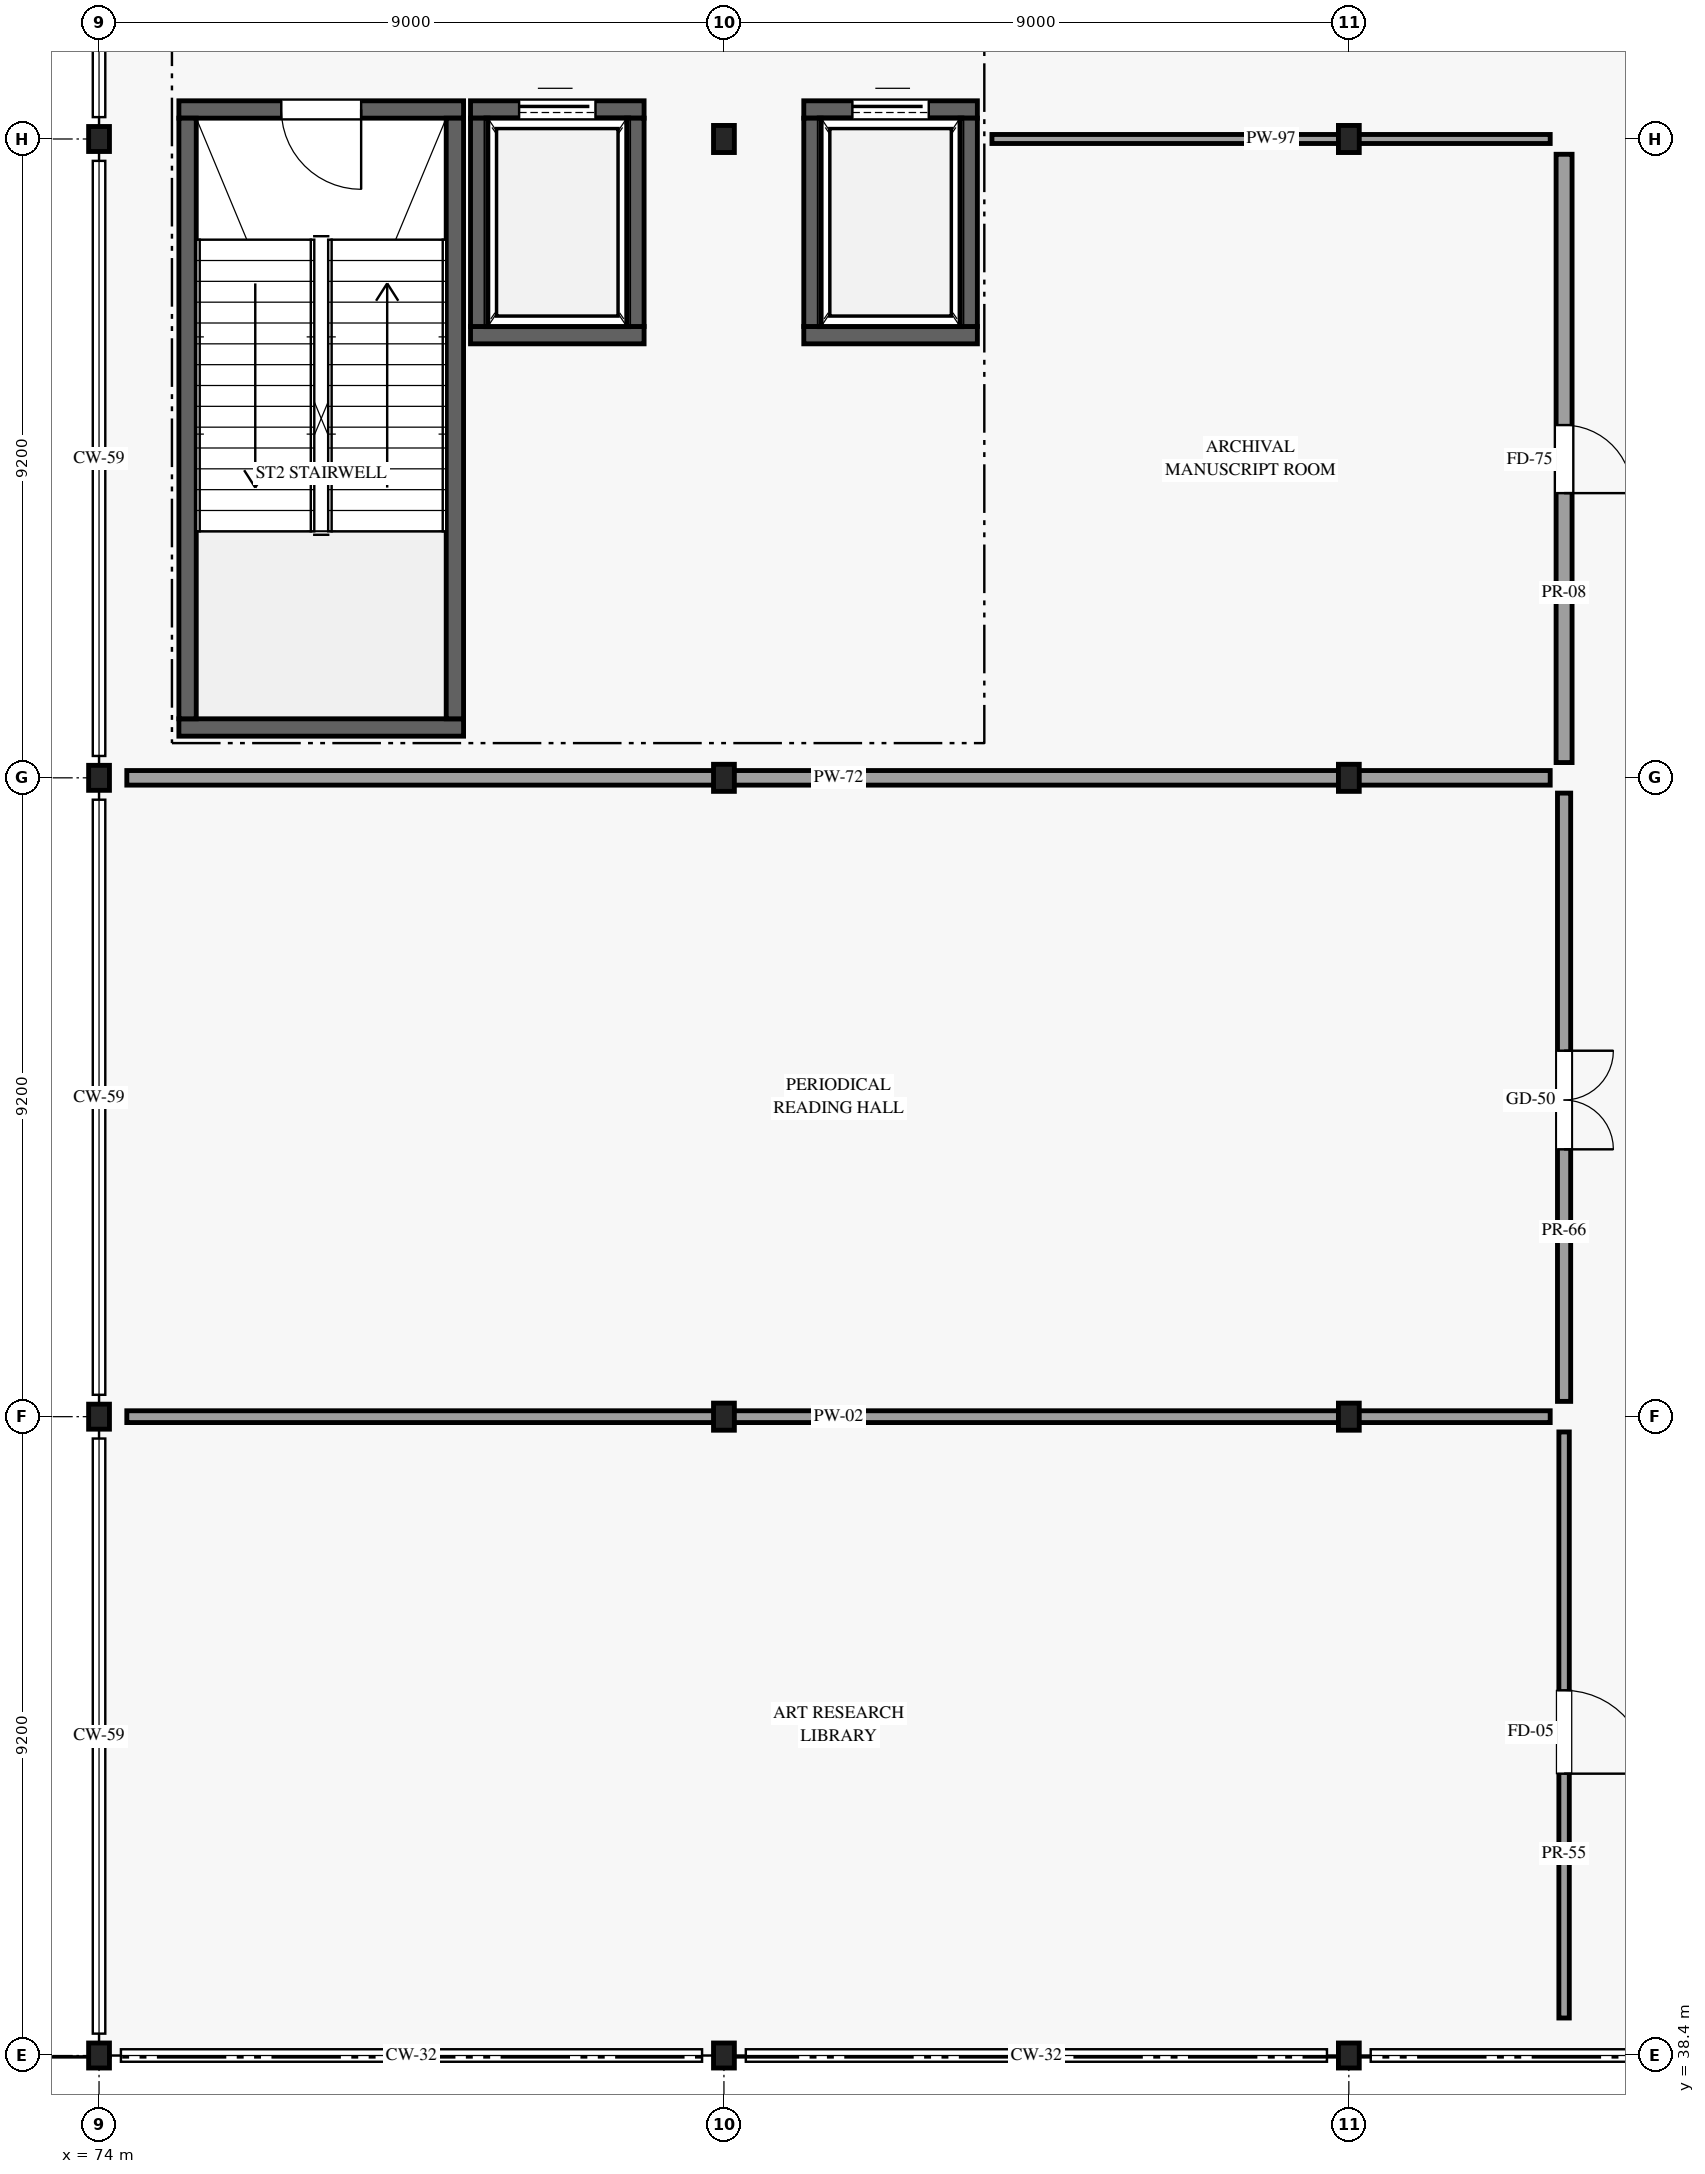
"""IFC4 building model, lengths in metres.
Left out: names, types, materials, properties, quantities, classifications, styles, units other than length and angle.
Written with IfcOpenShell. Run it as: python <this file> out.ifc"""

import sys

from ifc_helpers import new_model, si_unit, direction, frame, frame_2d, origin, origin_2d, place, context, subcontext, project, spatial, rectangle, i_section, extrude, element, fill, save


model = new_model("IFC4")
c1 = context("Model", 3, precision=1e-05, world=origin(), true_north=direction((0.0, 1.0)))
c2 = subcontext(c1, "Body", "Model", "MODEL_VIEW")
j1 = project(units=[si_unit("LENGTHUNIT", "METRE"), si_unit("PLANEANGLEUNIT", "RADIAN")], contexts=[c1])
p1 = place(None, origin())
s1 = spatial("IfcSite", under=j1, at=p1, CompositionType="ELEMENT")
p2 = place(p1, origin())
s2 = spatial("IfcBuilding", under=s1, at=p2, CompositionType="ELEMENT")
p3 = place(p2, frame((0.0, 0.0, 15.0)))
s3 = spatial("IfcBuildingStorey", under=s2, at=p3, CompositionType="ELEMENT", Elevation=15.0)
for number, where, z_axis, x_axis in (
    (1, (74.0, 38.4, 0.0), (0.0, 0.0, 1.0), (1.0, 0.0, 0.0)),
    (2, (74.0, 47.6, 0.0), (0.0, 0.0, 1.0), (1.0, 0.0, 0.0)),
    (3, (74.0, 56.8, 0.0), (0.0, 0.0, 1.0), (1.0, 0.0, 0.0)),
    (4, (74.0, 66.0, 0.0), (0.0, 0.0, 1.0), (1.0, 0.0, 0.0)),
    (5, (83.0, 38.4, 0.0), (0.0, 0.0, 1.0), (1.0, 0.0, 0.0)),
):
    element("IfcColumn", number, at=place(p3, frame(where, z_axis=z_axis, x_axis=x_axis)), inside=s3, PredefinedType="COLUMN", context=c2, shape_type="SweptSolid", body=[
        extrude(i_section(OverallWidth=0.3, OverallDepth=0.36, WebThickness=0.012, FlangeThickness=0.022, FilletRadius=0.027, at=origin_2d()), origin(), (0.0, 0.0, 1.0), 4.5),
    ])
for number, where, z_axis, x_axis in (
    (6, (83.0, 47.6, 0.0), (0.0, 0.0, 1.0), (1.0, 0.0, 0.0)),
    (7, (83.0, 56.8, 0.0), (0.0, 0.0, 1.0), (1.0, 0.0, 0.0)),
    (8, (83.0, 66.0, 0.0), (0.0, 0.0, 1.0), (1.0, 0.0, 0.0)),
):
    element("IfcColumn", number, at=place(p3, frame(where, z_axis=z_axis, x_axis=x_axis)), inside=s3, PredefinedType="COLUMN", context=c2, shape_type="SweptSolid", body=[
        extrude(i_section(OverallWidth=0.3, OverallDepth=0.39, WebThickness=0.011, FlangeThickness=0.019, FilletRadius=0.027, at=origin_2d()), origin(), (0.0, 0.0, 1.0), 4.5),
    ])
p4 = place(p3, frame((92.0, 38.4, 0.0), z_axis=(0.0, 0.0, 1.0), x_axis=(1.0, 0.0, 0.0)))
e9 = element("IfcColumn", 9, at=p4, inside=s3, PredefinedType="COLUMN", context=c2, shape_type="SweptSolid", body=[
    extrude(i_section(OverallWidth=0.3, OverallDepth=0.36, WebThickness=0.012, FlangeThickness=0.022, FilletRadius=0.027, at=origin_2d()), origin(), (0.0, 0.0, 1.0), 4.5),
])
for number, where, z_axis, x_axis in (
    (10, (92.0, 47.6, 0.0), (0.0, 0.0, 1.0), (1.0, 0.0, 0.0)),
    (11, (92.0, 56.8, 0.0), (0.0, 0.0, 1.0), (1.0, 0.0, 0.0)),
    (12, (92.0, 66.0, 0.0), (0.0, 0.0, 1.0), (1.0, 0.0, 0.0)),
):
    element("IfcColumn", number, at=place(p3, frame(where, z_axis=z_axis, x_axis=x_axis)), inside=s3, PredefinedType="COLUMN", context=c2, shape_type="SweptSolid", body=[
        extrude(i_section(OverallWidth=0.3, OverallDepth=0.39, WebThickness=0.011, FlangeThickness=0.019, FilletRadius=0.027, at=origin_2d()), origin(), (0.0, 0.0, 1.0), 4.5),
    ])
p5 = place(p3, frame((75.15, 66.425, 0.0), z_axis=(0.0, 0.0, 1.0), x_axis=(1.0, 0.0, 0.0)))
e13 = element("IfcWall", 13, at=p5, inside=s3, PredefinedType="SHEAR", context=c2, shape_type="SweptSolid", body=[
    extrude(rectangle(XDim=4.1, YDim=0.25, at=frame_2d((2.05, 0.0))), origin(), (0.0, 0.0, 1.0), 4.18),
])
p6 = place(p5, frame((2.625, 0.0, 0.0), z_axis=(0.0, 0.0, 1.0), x_axis=(-1.0, 0.0, 0.0)))
e14 = element("IfcOpeningElement", 14, at=p6, cuts=e13, PredefinedType="OPENING", context=c2, shape_type="SweptSolid", body=[
    extrude(rectangle(XDim=1.15, YDim=2.2, at=frame_2d((0.575, 1.1))), frame((0.0, 0.135, 0.0), z_axis=(0.0, -1.0, 0.0), x_axis=(1.0, 0.0, 0.0)), (0.0, 0.0, 1.0), 0.27),
])
p7 = place(p3, frame((75.15, 57.525, 0.0), z_axis=(0.0, 0.0, 1.0), x_axis=(1.0, 0.0, 0.0)))
e15 = element("IfcWall", 15, at=p7, inside=s3, PredefinedType="SHEAR", context=c2, shape_type="SweptSolid", body=[
    extrude(rectangle(XDim=4.1, YDim=0.25, at=frame_2d((2.05, 0.0))), origin(), (0.0, 0.0, 1.0), 4.18),
])
for number, where, z_axis, x_axis in (
    (16, (75.275, 57.65, 0.0), (0.0, 0.0, 1.0), (0.0, 1.0, 0.0)),
    (17, (79.125, 57.65, 0.0), (0.0, 0.0, 1.0), (0.0, 1.0, 0.0)),
):
    element("IfcWall", number, at=place(p3, frame(where, z_axis=z_axis, x_axis=x_axis)), inside=s3, PredefinedType="SHEAR", context=c2, shape_type="SweptSolid", body=[
        extrude(rectangle(XDim=8.65, YDim=0.25, at=frame_2d((4.325, 0.0))), origin(), (0.0, 0.0, 1.0), 4.18),
    ])
p8 = place(p3, frame((79.35, 66.425, 0.0), z_axis=(0.0, 0.0, 1.0), x_axis=(1.0, 0.0, 0.0)))
e18 = element("IfcWall", 18, at=p8, inside=s3, PredefinedType="SHEAR", context=c2, shape_type="SweptSolid", body=[
    extrude(rectangle(XDim=2.5, YDim=0.25, at=frame_2d((1.25, 0.0))), origin(), (0.0, 0.0, 1.0), 4.18),
])
p9 = place(p8, frame((0.7, 0.0, 0.0)))
e19 = element("IfcOpeningElement", 19, at=p9, cuts=e18, PredefinedType="OPENING", context=c2, shape_type="SweptSolid", body=[
    extrude(rectangle(XDim=1.1, YDim=2.2, at=frame_2d((0.55, 1.1))), frame((0.0, 0.135, 0.0), z_axis=(0.0, -1.0, 0.0), x_axis=(1.0, 0.0, 0.0)), (0.0, 0.0, 1.0), 0.27),
])
p10 = place(p3, frame((79.35, 63.175, 0.0), z_axis=(0.0, 0.0, 1.0), x_axis=(1.0, 0.0, 0.0)))
e20 = element("IfcWall", 20, at=p10, inside=s3, PredefinedType="SHEAR", context=c2, shape_type="SweptSolid", body=[
    extrude(rectangle(XDim=2.5, YDim=0.25, at=frame_2d((1.25, 0.0))), origin(), (0.0, 0.0, 1.0), 4.18),
])
for number, where, z_axis, x_axis in (
    (21, (81.725, 63.3, 0.0), (0.0, 0.0, 1.0), (0.0, 1.0, 0.0)),
    (22, (79.475, 63.3, 0.0), (0.0, 0.0, 1.0), (0.0, 1.0, 0.0)),
):
    element("IfcWall", number, at=place(p3, frame(where, z_axis=z_axis, x_axis=x_axis)), inside=s3, PredefinedType="SHEAR", context=c2, shape_type="SweptSolid", body=[
        extrude(rectangle(XDim=3.0, YDim=0.25, at=frame_2d((1.5, 0.0))), origin(), (0.0, 0.0, 1.0), 4.18),
    ])
p11 = place(p3, frame((84.15, 66.425, 0.0), z_axis=(0.0, 0.0, 1.0), x_axis=(1.0, 0.0, 0.0)))
e23 = element("IfcWall", 23, at=p11, inside=s3, PredefinedType="SHEAR", context=c2, shape_type="SweptSolid", body=[
    extrude(rectangle(XDim=2.5, YDim=0.25, at=frame_2d((1.25, 0.0))), origin(), (0.0, 0.0, 1.0), 4.18),
])
p12 = place(p11, frame((0.7, 0.0, 0.0)))
e24 = element("IfcOpeningElement", 24, at=p12, cuts=e23, PredefinedType="OPENING", context=c2, shape_type="SweptSolid", body=[
    extrude(rectangle(XDim=1.1, YDim=2.2, at=frame_2d((0.55, 1.1))), frame((0.0, 0.135, 0.0), z_axis=(0.0, -1.0, 0.0), x_axis=(1.0, 0.0, 0.0)), (0.0, 0.0, 1.0), 0.27),
])
p13 = place(p3, frame((84.15, 63.175, 0.0), z_axis=(0.0, 0.0, 1.0), x_axis=(1.0, 0.0, 0.0)))
e25 = element("IfcWall", 25, at=p13, inside=s3, PredefinedType="SHEAR", context=c2, shape_type="SweptSolid", body=[
    extrude(rectangle(XDim=2.5, YDim=0.25, at=frame_2d((1.25, 0.0))), origin(), (0.0, 0.0, 1.0), 4.18),
])
for number, where, z_axis, x_axis in (
    (26, (86.525, 63.3, 0.0), (0.0, 0.0, 1.0), (0.0, 1.0, 0.0)),
    (27, (84.275, 63.3, 0.0), (0.0, 0.0, 1.0), (0.0, 1.0, 0.0)),
):
    element("IfcWall", number, at=place(p3, frame(where, z_axis=z_axis, x_axis=x_axis)), inside=s3, PredefinedType="SHEAR", context=c2, shape_type="SweptSolid", body=[
        extrude(rectangle(XDim=3.0, YDim=0.25, at=frame_2d((1.5, 0.0))), origin(), (0.0, 0.0, 1.0), 4.18),
    ])
p14 = place(p3, frame((95.1, 38.94, 0.0), z_axis=(0.0, 0.0, 1.0), x_axis=(0.0, 1.0, 0.0)))
e28 = element("IfcWall", 28, at=p14, inside=s3, PredefinedType="PARTITIONING", context=c2, shape_type="SweptSolid", body=[
    extrude(rectangle(XDim=8.44, YDim=0.15, at=frame_2d((4.22, 0.0))), origin(), (0.0, 0.0, 1.0), 3.675),
])
p15 = place(p14, frame((4.719, 0.0, 0.0), z_axis=(0.0, 0.0, 1.0), x_axis=(-1.0, 0.0, 0.0)))
e29 = element("IfcOpeningElement", 29, at=p15, cuts=e28, PredefinedType="OPENING", context=c2, shape_type="SweptSolid", body=[
    extrude(rectangle(XDim=1.2, YDim=2.3, at=frame_2d((0.6, 1.15))), frame((0.0, 0.085, 0.0), z_axis=(0.0, -1.0, 0.0), x_axis=(1.0, 0.0, 0.0)), (0.0, 0.0, 1.0), 0.17),
])
p16 = place(p3, frame((74.4, 47.6, 0.0), z_axis=(0.0, 0.0, 1.0), x_axis=(1.0, 0.0, 0.0)))
e30 = element("IfcWall", 30, at=p16, inside=s3, PredefinedType="PARTITIONING", context=c2, shape_type="SweptSolid", body=[
    extrude(rectangle(XDim=20.5, YDim=0.17, at=frame_2d((10.25, 0.0))), origin(), (0.0, 0.0, 1.0), 3.675),
])
p17 = place(p3, frame((95.1, 47.82, 0.0), z_axis=(0.0, 0.0, 1.0), x_axis=(0.0, 1.0, 0.0)))
e31 = element("IfcWall", 31, at=p17, inside=s3, PredefinedType="PARTITIONING", context=c2, shape_type="SweptSolid", body=[
    extrude(rectangle(XDim=8.76, YDim=0.19, at=frame_2d((4.38, 0.0))), origin(), (0.0, 0.0, 1.0), 3.675),
])
p18 = place(p17, frame((5.05, 0.0, 0.0), z_axis=(0.0, 0.0, 1.0), x_axis=(-1.0, 0.0, 0.0)))
e32 = element("IfcOpeningElement", 32, at=p18, cuts=e31, PredefinedType="OPENING", context=c2, shape_type="SweptSolid", body=[
    extrude(rectangle(XDim=1.42, YDim=2.3, at=frame_2d((0.71, 1.15))), frame((0.0, 0.105, 0.0), z_axis=(0.0, -1.0, 0.0), x_axis=(1.0, 0.0, 0.0)), (0.0, 0.0, 1.0), 0.21),
])
p19 = place(p3, frame((74.4, 56.8, 0.0), z_axis=(0.0, 0.0, 1.0), x_axis=(1.0, 0.0, 0.0)))
e33 = element("IfcWall", 33, at=p19, inside=s3, PredefinedType="PARTITIONING", context=c2, shape_type="SweptSolid", body=[
    extrude(rectangle(XDim=20.5, YDim=0.21, at=frame_2d((10.25, 0.0))), origin(), (0.0, 0.0, 1.0), 3.675),
])
p20 = place(p3, frame((95.1, 57.02, 0.0), z_axis=(0.0, 0.0, 1.0), x_axis=(0.0, 1.0, 0.0)))
e34 = element("IfcWall", 34, at=p20, inside=s3, PredefinedType="PARTITIONING", context=c2, shape_type="SweptSolid", body=[
    extrude(rectangle(XDim=8.76, YDim=0.23, at=frame_2d((4.38, 0.0))), origin(), (0.0, 0.0, 1.0), 3.675),
])
p21 = place(p20, frame((4.86, 0.0, 0.0), z_axis=(0.0, 0.0, 1.0), x_axis=(-1.0, 0.0, 0.0)))
e35 = element("IfcOpeningElement", 35, at=p21, cuts=e34, PredefinedType="OPENING", context=c2, shape_type="SweptSolid", body=[
    extrude(rectangle(XDim=0.98, YDim=2.18, at=frame_2d((0.49, 1.09))), frame((0.0, 0.125, 0.0), z_axis=(0.0, -1.0, 0.0), x_axis=(1.0, 0.0, 0.0)), (0.0, 0.0, 1.0), 0.25),
])
p22 = place(p3, frame((86.86, 66.0, 0.0), z_axis=(0.0, 0.0, 1.0), x_axis=(1.0, 0.0, 0.0)))
e36 = element("IfcWall", 36, at=p22, inside=s3, PredefinedType="PARTITIONING", context=c2, shape_type="SweptSolid", body=[
    extrude(rectangle(XDim=8.04, YDim=0.13, at=frame_2d((4.02, 0.0))), origin(), (0.0, 0.0, 1.0), 3.675),
])
p23 = place(p6, origin())
e37 = element("IfcDoor", 37, at=p23, inside=s3, OperationType="SINGLE_SWING_LEFT", PredefinedType="DOOR", context=c2, shape_type="SweptSolid", body=[
    extrude(rectangle(XDim=1.15, YDim=2.2, at=frame_2d((0.575, 1.1))), frame((0.0, 0.025, 0.0), z_axis=(0.0, -1.0, 0.0), x_axis=(1.0, 0.0, 0.0)), (0.0, 0.0, 1.0), 0.05),
])
fill(e14, e37)
p24 = place(p9, origin())
e38 = element("IfcDoor", 38, at=p24, inside=s3, OperationType="SLIDING_TO_LEFT", PredefinedType="DOOR", context=c2, shape_type="SweptSolid", body=[
    extrude(rectangle(XDim=1.1, YDim=2.2, at=frame_2d((0.55, 1.1))), frame((0.0, 0.025, 0.0), z_axis=(0.0, -1.0, 0.0), x_axis=(1.0, 0.0, 0.0)), (0.0, 0.0, 1.0), 0.05),
])
fill(e19, e38)
p25 = place(p12, origin())
e39 = element("IfcDoor", 39, at=p25, inside=s3, OperationType="SLIDING_TO_RIGHT", PredefinedType="DOOR", context=c2, shape_type="SweptSolid", body=[
    extrude(rectangle(XDim=1.1, YDim=2.2, at=frame_2d((0.55, 1.1))), frame((0.0, 0.025, 0.0), z_axis=(0.0, -1.0, 0.0), x_axis=(1.0, 0.0, 0.0)), (0.0, 0.0, 1.0), 0.05),
])
fill(e24, e39)
p26 = place(p15, origin())
e40 = element("IfcDoor", 40, at=p26, inside=s3, OperationType="SINGLE_SWING_RIGHT", PredefinedType="DOOR", context=c2, shape_type="SweptSolid", body=[
    extrude(rectangle(XDim=1.2, YDim=2.3, at=frame_2d((0.6, 1.15))), frame((0.0, 0.025, 0.0), z_axis=(0.0, -1.0, 0.0), x_axis=(1.0, 0.0, 0.0)), (0.0, 0.0, 1.0), 0.05),
])
fill(e29, e40)
p27 = place(p18, origin())
e41 = element("IfcDoor", 41, at=p27, inside=s3, OperationType="DOUBLE_DOOR_SINGLE_SWING", PredefinedType="DOOR", context=c2, shape_type="SweptSolid", body=[
    extrude(rectangle(XDim=1.42, YDim=2.3, at=frame_2d((0.71, 1.15))), frame((0.0, 0.025, 0.0), z_axis=(0.0, -1.0, 0.0), x_axis=(1.0, 0.0, 0.0)), (0.0, 0.0, 1.0), 0.05),
])
fill(e32, e41)
p28 = place(p21, origin())
e42 = element("IfcDoor", 42, at=p28, inside=s3, OperationType="SINGLE_SWING_RIGHT", PredefinedType="DOOR", context=c2, shape_type="SweptSolid", body=[
    extrude(rectangle(XDim=0.98, YDim=2.18, at=frame_2d((0.49, 1.09))), frame((0.0, 0.025, 0.0), z_axis=(0.0, -1.0, 0.0), x_axis=(1.0, 0.0, 0.0)), (0.0, 0.0, 1.0), 0.05),
])
fill(e35, e42)
save(model, sys.argv[1])
